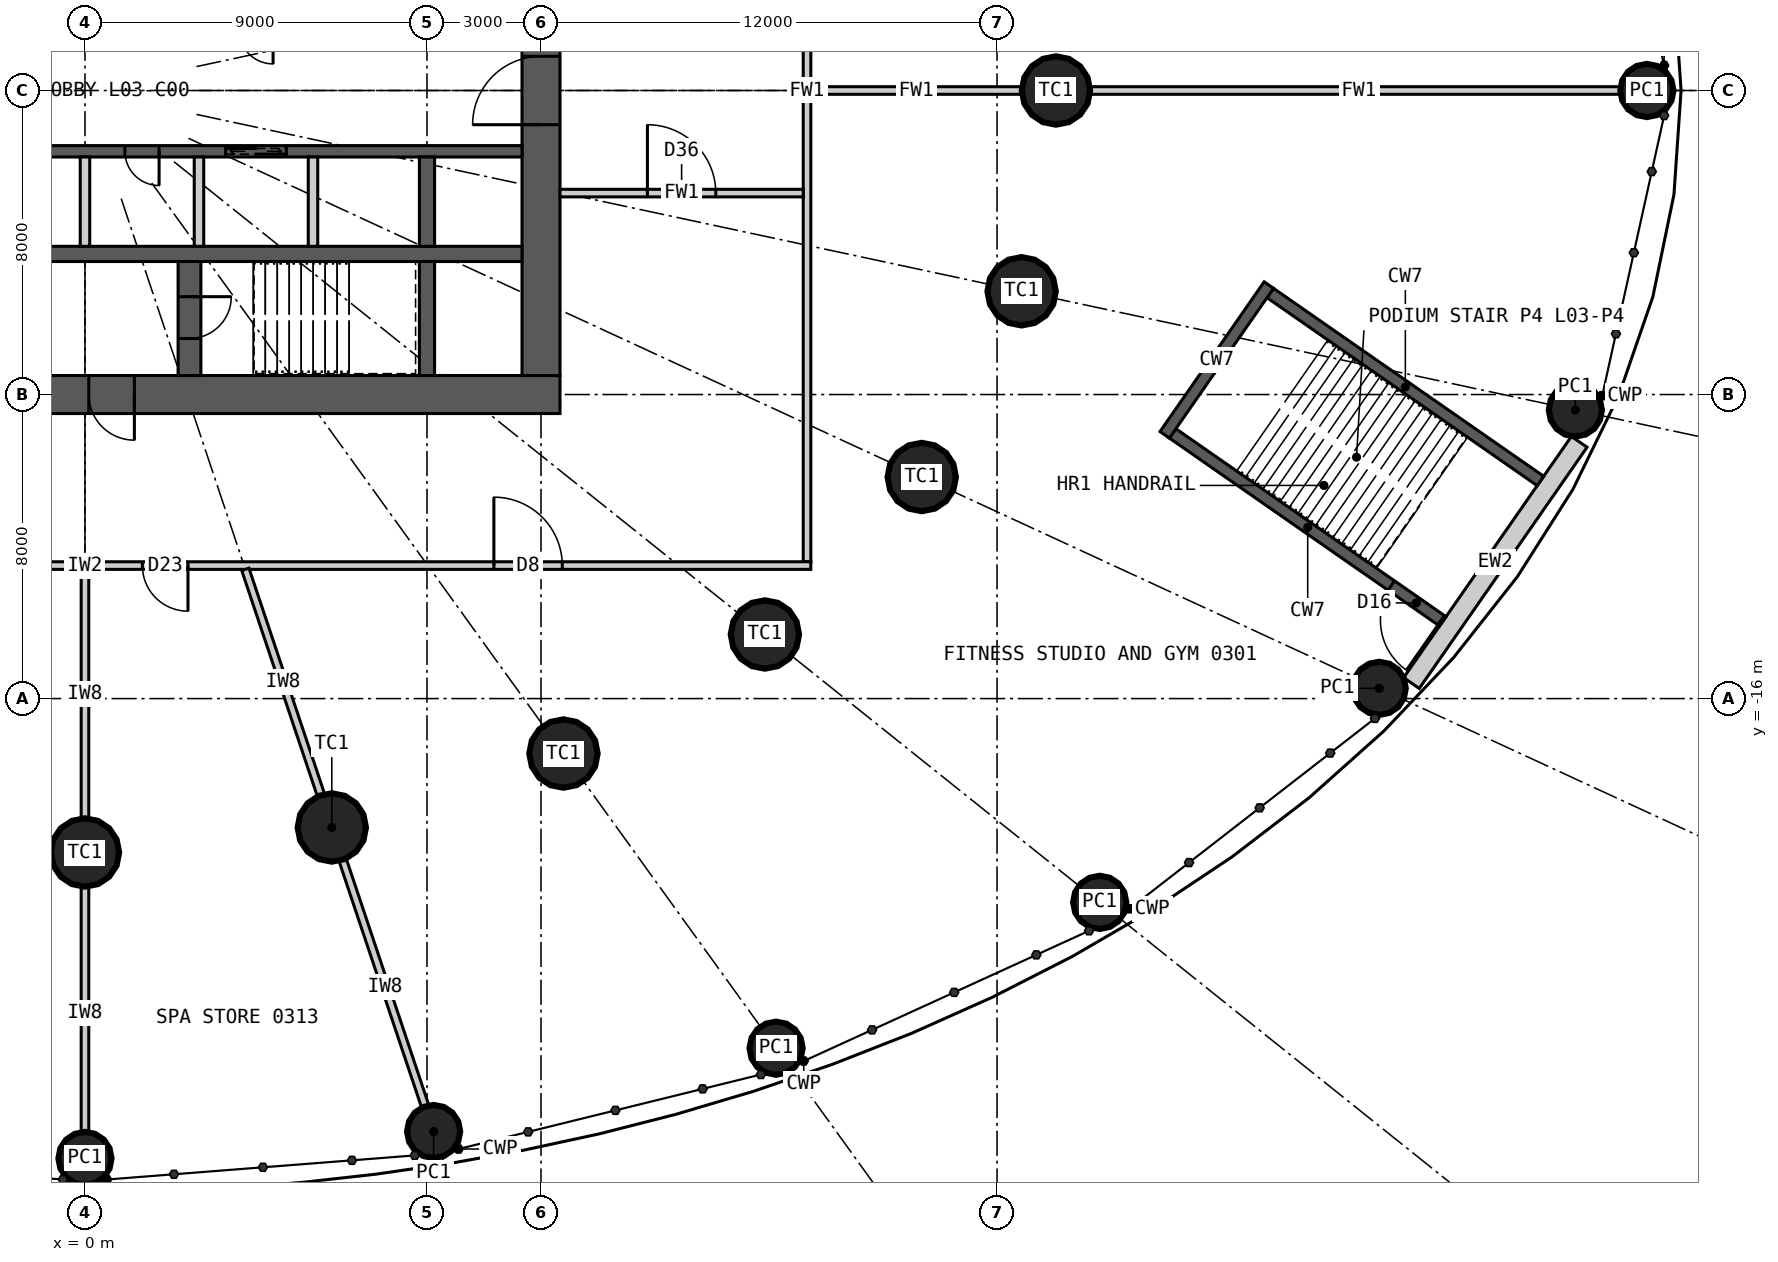
"""IFC4 building model, lengths in metres.
Left out: names, types, materials, properties, quantities, classifications, styles, units other than length and angle.
Written with IfcOpenShell. Run it as: python <this file> out.ifc"""

import sys

from ifc_helpers import new_model, si_unit, direction, frame, frame_2d, origin, origin_2d, place, context, subcontext, project, spatial, rectangle, circle, extrude, element, fill, save


model = new_model("IFC4")
c1 = context("Model", 3, precision=1e-05, world=origin(), true_north=direction((0.0, 1.0)))
c2 = subcontext(c1, "Body", "Model", "MODEL_VIEW")
j1 = project(units=[si_unit("LENGTHUNIT", "METRE"), si_unit("PLANEANGLEUNIT", "RADIAN")], contexts=[c1])
p1 = place(None, origin())
s1 = spatial("IfcSite", under=j1, at=p1, CompositionType="ELEMENT")
p2 = place(p1, origin())
s2 = spatial("IfcBuilding", under=s1, at=p2, CompositionType="ELEMENT")
p3 = place(p2, frame((0.0, 0.0, 19.2)))
s3 = spatial("IfcBuildingStorey", under=s2, at=p3, CompositionType="ELEMENT", Elevation=19.2)
for number, where, z_axis, x_axis in (
    (1, (25.55, 0.0, 0.0), (0.0, 0.0, 1.0), (1.0, 0.0, 0.0)),
    (2, (0.0, -20.05, 0.0), (0.0, 0.0, 1.0), (1.0, 0.0, 0.0)),
    (3, (6.495, -19.391, 0.0), (0.0, 0.0, 1.0), (1.0, 0.0, 0.0)),
    (4, (12.591, -17.447, 0.0), (0.0, 0.0, 1.0), (1.0, 0.0, 0.0)),
    (5, (17.892, -14.313, 0.0), (0.0, 0.0, 1.0), (1.0, 0.0, 0.0)),
    (6, (22.019, -10.17, 0.0), (0.0, 0.0, 1.0), (1.0, 0.0, 0.0)),
    (7, (24.647, -5.283, 0.0), (0.0, 0.0, 1.0), (1.0, 0.0, 0.0)),
):
    element("IfcColumn", number, at=place(p3, frame(where, z_axis=z_axis, x_axis=x_axis)), inside=s3, PredefinedType="COLUMN", context=c2, shape_type="SweptSolid", body=[
        extrude(circle(Radius=0.9, at=origin_2d()), origin(), (0.0, 0.0, 1.0), 5.4),
    ])
for number, where, z_axis, x_axis in (
    (8, (41.1, 0.0, 0.0), (0.0, 0.0, 1.0), (1.0, 0.0, 0.0)),
    (9, (0.0, -28.1, 0.0), (0.0, 0.0, 1.0), (1.0, 0.0, 0.0)),
    (10, (9.174, -27.391, 0.0), (0.0, 0.0, 1.0), (1.0, 0.0, 0.0)),
    (11, (18.186, -25.199, 0.0), (0.0, 0.0, 1.0), (1.0, 0.0, 0.0)),
    (12, (26.702, -21.362, 0.0), (0.0, 0.0, 1.0), (1.0, 0.0, 0.0)),
    (13, (34.057, -15.73, 0.0), (0.0, 0.0, 1.0), (1.0, 0.0, 0.0)),
    (14, (39.218, -8.407, 0.0), (0.0, 0.0, 1.0), (1.0, 0.0, 0.0)),
):
    element("IfcColumn", number, at=place(p3, frame(where, z_axis=z_axis, x_axis=x_axis)), inside=s3, PredefinedType="COLUMN", context=c2, shape_type="SweptSolid", body=[
        extrude(circle(Radius=0.7, at=origin_2d()), origin(), (0.0, 0.0, 1.0), 5.4),
    ])
p4 = place(p3, frame((12.5, -8.0, 0.0), z_axis=(0.0, 0.0, 1.0), x_axis=(-1.0, 0.0, 0.0)))
e15 = element("IfcWall", 15, at=p4, inside=s3, PredefinedType="SHEAR", context=c2, shape_type="SweptSolid", body=[
    extrude(rectangle(XDim=25.0, YDim=1.0, at=frame_2d((12.5, 0.0))), origin(), (0.0, 0.0, 1.0), 5.4),
])
p5 = place(p4, frame((11.2, 0.0, 0.0)))
e16 = element("IfcOpeningElement", 16, at=p5, cuts=e15, PredefinedType="OPENING", context=c2, shape_type="SweptSolid", body=[
    extrude(rectangle(XDim=1.2, YDim=2.2, at=frame_2d((0.6, 1.1))), frame((0.0, 0.51, 0.0), z_axis=(0.0, -1.0, 0.0), x_axis=(1.0, 0.0, 0.0)), (0.0, 0.0, 1.0), 1.02),
])
p6 = place(p4, frame((18.8, 0.0, 0.0)))
e17 = element("IfcOpeningElement", 17, at=p6, cuts=e15, PredefinedType="OPENING", context=c2, shape_type="SweptSolid", body=[
    extrude(rectangle(XDim=0.9, YDim=2.2, at=frame_2d((0.45, 1.1))), frame((0.0, 0.51, 0.0), z_axis=(0.0, -1.0, 0.0), x_axis=(1.0, 0.0, 0.0)), (0.0, 0.0, 1.0), 1.02),
])
p7 = place(p3, frame((12.0, -7.5, 0.0), z_axis=(0.0, 0.0, 1.0), x_axis=(0.0, 1.0, 0.0)))
e18 = element("IfcWall", 18, at=p7, inside=s3, PredefinedType="SHEAR", context=c2, shape_type="SweptSolid", body=[
    extrude(rectangle(XDim=15.0, YDim=1.0, at=frame_2d((7.5, 0.0))), origin(), (0.0, 0.0, 1.0), 5.4),
])
p8 = place(p7, frame((6.6, 0.0, 0.0)))
e19 = element("IfcOpeningElement", 19, at=p8, cuts=e18, PredefinedType="OPENING", context=c2, shape_type="SweptSolid", body=[
    extrude(rectangle(XDim=1.8, YDim=2.2, at=frame_2d((0.9, 1.1))), frame((0.0, 0.51, 0.0), z_axis=(0.0, -1.0, 0.0), x_axis=(1.0, 0.0, 0.0)), (0.0, 0.0, 1.0), 1.02),
])
p9 = place(p3, frame((-11.5, -4.3, 0.0), z_axis=(0.0, 0.0, 1.0), x_axis=(1.0, 0.0, 0.0)))
e20 = element("IfcWall", 20, at=p9, inside=s3, PredefinedType="SHEAR", context=c2, shape_type="SweptSolid", body=[
    extrude(rectangle(XDim=23.0, YDim=0.4, at=frame_2d((11.5, 0.0))), origin(), (0.0, 0.0, 1.0), 5.4),
])
p10 = place(p3, frame((-11.5, -1.6, 0.0), z_axis=(0.0, 0.0, 1.0), x_axis=(1.0, 0.0, 0.0)))
e21 = element("IfcWall", 21, at=p10, inside=s3, PredefinedType="SHEAR", context=c2, shape_type="SweptSolid", body=[
    extrude(rectangle(XDim=23.0, YDim=0.3, at=frame_2d((11.5, 0.0))), origin(), (0.0, 0.0, 1.0), 5.4),
])
p11 = place(p10, frame((15.2, 0.0, 0.0)))
e22 = element("IfcOpeningElement", 22, at=p11, cuts=e21, PredefinedType="OPENING", context=c2, shape_type="SweptSolid", body=[
    extrude(rectangle(XDim=1.6, YDim=2.4, at=frame_2d((0.8, 1.2))), frame((0.0, 0.16, 0.0), z_axis=(0.0, -1.0, 0.0), x_axis=(1.0, 0.0, 0.0)), (0.0, 0.0, 1.0), 0.32),
])
p12 = place(p10, frame((8.05, 0.0, 0.0)))
e23 = element("IfcOpeningElement", 23, at=p12, cuts=e21, PredefinedType="OPENING", context=c2, shape_type="SweptSolid", body=[
    extrude(rectangle(XDim=0.9, YDim=2.2, at=frame_2d((0.45, 1.1))), frame((0.0, 0.16, 0.0), z_axis=(0.0, -1.0, 0.0), x_axis=(1.0, 0.0, 0.0)), (0.0, 0.0, 1.0), 0.32),
])
p13 = place(p10, frame((12.55, 0.0, 0.0)))
e24 = element("IfcOpeningElement", 24, at=p13, cuts=e21, PredefinedType="OPENING", context=c2, shape_type="SweptSolid", body=[
    extrude(rectangle(XDim=0.9, YDim=2.2, at=frame_2d((0.45, 1.1))), frame((0.0, 0.16, 0.0), z_axis=(0.0, -1.0, 0.0), x_axis=(1.0, 0.0, 0.0)), (0.0, 0.0, 1.0), 0.32),
])
p14 = place(p3, frame((9.0, -4.1, 0.0), z_axis=(0.0, 0.0, 1.0), x_axis=(0.0, 1.0, 0.0)))
e25 = element("IfcWall", 25, at=p14, inside=s3, PredefinedType="SHEAR", context=c2, shape_type="SweptSolid", body=[
    extrude(rectangle(XDim=2.35, YDim=0.4, at=frame_2d((1.175, 0.0))), origin(), (0.0, 0.0, 1.0), 5.4),
])
p15 = place(p3, frame((9.0, -7.5, 0.0), z_axis=(0.0, 0.0, 1.0), x_axis=(0.0, 1.0, 0.0)))
e26 = element("IfcWall", 26, at=p15, inside=s3, PredefinedType="SHEAR", context=c2, shape_type="SweptSolid", body=[
    extrude(rectangle(XDim=3.0, YDim=0.4, at=frame_2d((1.5, 0.0))), origin(), (0.0, 0.0, 1.0), 5.4),
])
p16 = place(p3, frame((2.75, -7.5, 0.0), z_axis=(0.0, 0.0, 1.0), x_axis=(0.0, 1.0, 0.0)))
e27 = element("IfcWall", 27, at=p16, inside=s3, PredefinedType="SHEAR", context=c2, shape_type="SweptSolid", body=[
    extrude(rectangle(XDim=3.0, YDim=0.6, at=frame_2d((1.5, 0.0))), origin(), (0.0, 0.0, 1.0), 5.4),
])
p17 = place(p16, frame((0.975, 0.0, 0.0)))
e28 = element("IfcOpeningElement", 28, at=p17, cuts=e27, PredefinedType="OPENING", context=c2, shape_type="SweptSolid", body=[
    extrude(rectangle(XDim=1.1, YDim=2.2, at=frame_2d((0.55, 1.1))), frame((0.0, 0.31, 0.0), z_axis=(0.0, -1.0, 0.0), x_axis=(1.0, 0.0, 0.0)), (0.0, 0.0, 1.0), 0.62),
])
for number, where, z_axis, x_axis in (
    (29, (0.0, -4.1, 0.0), (0.0, 0.0, 1.0), (0.0, 1.0, 0.0)),
    (30, (3.0, -4.1, 0.0), (0.0, 0.0, 1.0), (0.0, 1.0, 0.0)),
    (31, (6.0, -4.1, 0.0), (0.0, 0.0, 1.0), (0.0, 1.0, 0.0)),
):
    element("IfcWall", number, at=place(p3, frame(where, z_axis=z_axis, x_axis=x_axis)), inside=s3, PredefinedType="PARTITIONING", context=c2, shape_type="SweptSolid", body=[
        extrude(rectangle(XDim=2.35, YDim=0.25, at=frame_2d((1.175, 0.0))), origin(), (0.0, 0.0, 1.0), 5.4),
    ])
p18 = place(p3, frame((34.905, -15.592, 0.0), z_axis=(0.0, 0.0, 1.0), x_axis=(0.571029335057, 0.820929655028, 0.0)))
e32 = element("IfcWall", 32, at=p18, inside=s3, PredefinedType="SOLIDWALL", context=c2, shape_type="SweptSolid", body=[
    extrude(rectangle(XDim=7.733, YDim=0.5, at=frame_2d((3.866, 0.0))), origin(), (0.0, 0.0, 1.0), 5.15),
])
p19 = place(p3, frame((19.0, -12.4, 0.0), z_axis=(0.0, 0.0, 1.0), x_axis=(0.0, 1.0, 0.0)))
e33 = element("IfcWall", 33, at=p19, inside=s3, PredefinedType="PARTITIONING", context=c2, shape_type="SweptSolid", body=[
    extrude(rectangle(XDim=24.8, YDim=0.2, at=frame_2d((12.4, 0.0))), origin(), (0.0, 0.0, 1.0), 5.15),
])
p20 = place(p19, frame((17.8, 0.0, 0.0)))
e34 = element("IfcOpeningElement", 34, at=p20, cuts=e33, PredefinedType="OPENING", context=c2, shape_type="SweptSolid", body=[
    extrude(rectangle(XDim=1.8, YDim=2.4, at=frame_2d((0.9, 1.2))), frame((0.0, 0.11, 0.0), z_axis=(0.0, -1.0, 0.0), x_axis=(1.0, 0.0, 0.0)), (0.0, 0.0, 1.0), 0.22),
])
p21 = place(p3, frame((19.1, -12.5, 0.0), z_axis=(0.0, 0.0, 1.0), x_axis=(-1.0, 0.0, 0.0)))
e35 = element("IfcWall", 35, at=p21, inside=s3, PredefinedType="PARTITIONING", context=c2, shape_type="SweptSolid", body=[
    extrude(rectangle(XDim=38.2, YDim=0.2, at=frame_2d((19.1, 0.0))), origin(), (0.0, 0.0, 1.0), 5.15),
])
p22 = place(p21, frame((6.54, 0.0, 0.0)))
e36 = element("IfcOpeningElement", 36, at=p22, cuts=e35, PredefinedType="OPENING", context=c2, shape_type="SweptSolid", body=[
    extrude(rectangle(XDim=1.8, YDim=2.4, at=frame_2d((0.9, 1.2))), frame((0.0, 0.11, 0.0), z_axis=(0.0, -1.0, 0.0), x_axis=(1.0, 0.0, 0.0)), (0.0, 0.0, 1.0), 0.22),
])
p23 = place(p21, frame((27.52, 0.0, 0.0)))
e37 = element("IfcOpeningElement", 37, at=p23, cuts=e35, PredefinedType="OPENING", context=c2, shape_type="SweptSolid", body=[
    extrude(rectangle(XDim=1.0, YDim=2.2, at=frame_2d((0.5, 1.1))), frame((0.0, 0.11, 0.0), z_axis=(0.0, -1.0, 0.0), x_axis=(1.0, 0.0, 0.0)), (0.0, 0.0, 1.0), 0.22),
])
p24 = place(p21, frame((20.71, 0.0, 0.0)))
e38 = element("IfcOpeningElement", 38, at=p24, cuts=e35, PredefinedType="OPENING", context=c2, shape_type="SweptSolid", body=[
    extrude(rectangle(XDim=1.0, YDim=2.2, at=frame_2d((0.5, 1.1))), frame((0.0, 0.11, 0.0), z_axis=(0.0, -1.0, 0.0), x_axis=(1.0, 0.0, 0.0)), (0.0, 0.0, 1.0), 0.22),
])
p25 = place(p21, frame((16.39, 0.0, 0.0)))
e39 = element("IfcOpeningElement", 39, at=p25, cuts=e35, PredefinedType="OPENING", context=c2, shape_type="SweptSolid", body=[
    extrude(rectangle(XDim=1.2, YDim=2.2, at=frame_2d((0.6, 1.1))), frame((0.0, 0.11, 0.0), z_axis=(0.0, -1.0, 0.0), x_axis=(1.0, 0.0, 0.0)), (0.0, 0.0, 1.0), 0.22),
])
p26 = place(p21, frame((33.62, 0.0, 0.0)))
e40 = element("IfcOpeningElement", 40, at=p26, cuts=e35, PredefinedType="OPENING", context=c2, shape_type="SweptSolid", body=[
    extrude(rectangle(XDim=1.0, YDim=2.2, at=frame_2d((0.5, 1.1))), frame((0.0, 0.11, 0.0), z_axis=(0.0, -1.0, 0.0), x_axis=(1.0, 0.0, 0.0)), (0.0, 0.0, 1.0), 0.22),
])
p27 = place(p3, frame((19.1, 0.0, 0.0), z_axis=(0.0, 0.0, 1.0), x_axis=(1.0, 0.0, 0.0)))
e41 = element("IfcWall", 41, at=p27, inside=s3, PredefinedType="PARTITIONING", context=c2, shape_type="SweptSolid", body=[
    extrude(rectangle(XDim=5.55, YDim=0.2, at=frame_2d((2.775, 0.0))), origin(), (0.0, 0.0, 1.0), 4.25),
])
p28 = place(p3, frame((26.45, 0.0, 0.0), z_axis=(0.0, 0.0, 1.0), x_axis=(1.0, 0.0, 0.0)))
e42 = element("IfcWall", 42, at=p28, inside=s3, PredefinedType="PARTITIONING", context=c2, shape_type="SweptSolid", body=[
    extrude(rectangle(XDim=14.15, YDim=0.2, at=frame_2d((7.075, 0.0))), origin(), (0.0, 0.0, 1.0), 4.25),
])
p29 = place(p3, frame((0.0, -12.6, 0.0), z_axis=(0.0, 0.0, 1.0), x_axis=(0.0, -1.0, 0.0)))
e43 = element("IfcWall", 43, at=p29, inside=s3, PredefinedType="PARTITIONING", context=c2, shape_type="SweptSolid", body=[
    extrude(rectangle(XDim=6.55, YDim=0.2, at=frame_2d((3.275, 0.0))), origin(), (0.0, 0.0, 1.0), 4.3),
])
p30 = place(p3, frame((0.0, -20.95, 0.0), z_axis=(0.0, 0.0, 1.0), x_axis=(0.0, -1.0, 0.0)))
e44 = element("IfcWall", 44, at=p30, inside=s3, PredefinedType="PARTITIONING", context=c2, shape_type="SweptSolid", body=[
    extrude(rectangle(XDim=6.65, YDim=0.2, at=frame_2d((3.325, 0.0))), origin(), (0.0, 0.0, 1.0), 4.25),
])
p31 = place(p3, frame((4.22, -12.6, 0.0), z_axis=(0.0, 0.0, 1.0), x_axis=(0.317584173452, -0.9482300843, 0.0)))
e45 = element("IfcWall", 45, at=p31, inside=s3, PredefinedType="PARTITIONING", context=c2, shape_type="SweptSolid", body=[
    extrude(rectangle(XDim=6.262, YDim=0.2, at=frame_2d((3.131, 0.0))), origin(), (0.0, 0.0, 1.0), 4.3),
])
p32 = place(p3, frame((6.781, -20.245, 0.0), z_axis=(0.0, 0.0, 1.0), x_axis=(0.317580622989, -0.948231273425, 0.0)))
e46 = element("IfcWall", 46, at=p32, inside=s3, PredefinedType="PARTITIONING", context=c2, shape_type="SweptSolid", body=[
    extrude(rectangle(XDim=7.036, YDim=0.2, at=frame_2d((3.518, 0.0))), origin(), (0.0, 0.0, 1.0), 4.25),
])
p33 = place(p3, frame((35.729, -13.968, 0.0), z_axis=(0.0, 0.0, 1.0), x_axis=(-0.82092761123, 0.571032273274, 0.0)))
e47 = element("IfcWall", 47, at=p33, inside=s3, PredefinedType="SHEAR", context=c2, shape_type="SweptSolid", body=[
    extrude(rectangle(XDim=8.66, YDim=0.3, at=frame_2d((4.33, 0.0))), origin(), (0.0, 0.0, 1.0), 5.4),
])
p34 = place(p33, frame((0.05, 0.0, 0.0)))
e48 = element("IfcOpeningElement", 48, at=p34, cuts=e47, PredefinedType="OPENING", context=c2, shape_type="SweptSolid", body=[
    extrude(rectangle(XDim=1.6, YDim=2.1, at=frame_2d((0.8, 1.05))), frame((0.0, 0.16, 0.0), z_axis=(0.0, -1.0, 0.0), x_axis=(1.0, 0.0, 0.0)), (0.0, 0.0, 1.0), 0.32),
])
p35 = place(p3, frame((38.299, -10.274, 0.0), z_axis=(0.0, 0.0, 1.0), x_axis=(-0.820936803751, 0.571019057692, 0.0)))
e49 = element("IfcWall", 49, at=p35, inside=s3, PredefinedType="SHEAR", context=c2, shape_type="SweptSolid", body=[
    extrude(rectangle(XDim=8.66, YDim=0.3, at=frame_2d((4.33, 0.0))), origin(), (0.0, 0.0, 1.0), 5.4),
])
p36 = place(p3, frame((28.412, -9.06, 0.0), z_axis=(0.0, 0.0, 1.0), x_axis=(0.571036173178, 0.820924898467, 0.0)))
e50 = element("IfcWall", 50, at=p36, inside=s3, PredefinedType="SHEAR", context=c2, shape_type="SweptSolid", body=[
    extrude(rectangle(XDim=4.8, YDim=0.3, at=frame_2d((2.4, 0.0))), origin(), (0.0, 0.0, 1.0), 5.4),
])
p37 = place(p3, frame((18.9, -2.7, 0.0), z_axis=(0.0, 0.0, 1.0), x_axis=(-1.0, 0.0, 0.0)))
e51 = element("IfcWall", 51, at=p37, inside=s3, PredefinedType="PARTITIONING", context=c2, shape_type="SweptSolid", body=[
    extrude(rectangle(XDim=6.4, YDim=0.2, at=frame_2d((3.2, 0.0))), origin(), (0.0, 0.0, 1.0), 5.15),
])
p38 = place(p37, frame((2.3, 0.0, 0.0)))
e52 = element("IfcOpeningElement", 52, at=p38, cuts=e51, PredefinedType="OPENING", context=c2, shape_type="SweptSolid", body=[
    extrude(rectangle(XDim=1.8, YDim=2.4, at=frame_2d((0.9, 1.2))), frame((0.0, 0.11, 0.0), z_axis=(0.0, -1.0, 0.0), x_axis=(1.0, 0.0, 0.0)), (0.0, 0.0, 1.0), 0.22),
])
p39 = place(p34, origin())
e53 = element("IfcDoor", 53, at=p39, inside=s3, OperationType="SINGLE_SWING_LEFT", PredefinedType="DOOR", context=c2, shape_type="SweptSolid", body=[
    extrude(rectangle(XDim=1.6, YDim=2.1, at=frame_2d((0.8, 1.05))), frame((0.0, 0.025, 0.0), z_axis=(0.0, -1.0, 0.0), x_axis=(1.0, 0.0, 0.0)), (0.0, 0.0, 1.0), 0.05),
])
fill(e48, e53)
p40 = place(p22, origin())
e54 = element("IfcDoor", 54, at=p40, inside=s3, OperationType="DOUBLE_DOOR_DOUBLE_SWING", PredefinedType="DOOR", context=c2, shape_type="SweptSolid", body=[
    extrude(rectangle(XDim=1.8, YDim=2.4, at=frame_2d((0.9, 1.2))), frame((0.0, 0.025, 0.0), z_axis=(0.0, -1.0, 0.0), x_axis=(1.0, 0.0, 0.0)), (0.0, 0.0, 1.0), 0.05),
])
fill(e36, e54)
p41 = place(p25, origin())
e55 = element("IfcDoor", 55, at=p41, inside=s3, OperationType="SINGLE_SWING_LEFT", PredefinedType="DOOR", context=c2, shape_type="SweptSolid", body=[
    extrude(rectangle(XDim=1.2, YDim=2.2, at=frame_2d((0.6, 1.1))), frame((0.0, 0.025, 0.0), z_axis=(0.0, -1.0, 0.0), x_axis=(1.0, 0.0, 0.0)), (0.0, 0.0, 1.0), 0.05),
])
fill(e39, e55)
p42 = place(p38, origin())
e56 = element("IfcDoor", 56, at=p42, inside=s3, OperationType="DOUBLE_DOOR_DOUBLE_SWING", PredefinedType="DOOR", context=c2, shape_type="SweptSolid", body=[
    extrude(rectangle(XDim=1.8, YDim=2.4, at=frame_2d((0.9, 1.2))), frame((0.0, 0.025, 0.0), z_axis=(0.0, -1.0, 0.0), x_axis=(1.0, 0.0, 0.0)), (0.0, 0.0, 1.0), 0.05),
])
fill(e52, e56)
p43 = place(p5, origin())
e57 = element("IfcDoor", 57, at=p43, inside=s3, OperationType="SINGLE_SWING_LEFT", PredefinedType="DOOR", context=c2, shape_type="SweptSolid", body=[
    extrude(rectangle(XDim=1.2, YDim=2.2, at=frame_2d((0.6, 1.1))), frame((0.0, 0.025, 0.0), z_axis=(0.0, -1.0, 0.0), x_axis=(1.0, 0.0, 0.0)), (0.0, 0.0, 1.0), 0.05),
])
fill(e16, e57)
p44 = place(p17, origin())
e58 = element("IfcDoor", 58, at=p44, inside=s3, OperationType="SINGLE_SWING_RIGHT", PredefinedType="DOOR", context=c2, shape_type="SweptSolid", body=[
    extrude(rectangle(XDim=1.1, YDim=2.2, at=frame_2d((0.55, 1.1))), frame((0.0, 0.025, 0.0), z_axis=(0.0, -1.0, 0.0), x_axis=(1.0, 0.0, 0.0)), (0.0, 0.0, 1.0), 0.05),
])
fill(e28, e58)
p45 = place(p11, origin())
e59 = element("IfcDoor", 59, at=p45, inside=s3, OperationType="DOUBLE_DOOR_SLIDING", PredefinedType="DOOR", context=c2, shape_type="SweptSolid", body=[
    extrude(rectangle(XDim=1.6, YDim=2.4, at=frame_2d((0.8, 1.2))), frame((0.0, 0.025, 0.0), z_axis=(0.0, -1.0, 0.0), x_axis=(1.0, 0.0, 0.0)), (0.0, 0.0, 1.0), 0.05),
])
fill(e22, e59)
p46 = place(p13, origin())
e60 = element("IfcDoor", 60, at=p46, inside=s3, OperationType="SINGLE_SWING_RIGHT", PredefinedType="DOOR", context=c2, shape_type="SweptSolid", body=[
    extrude(rectangle(XDim=0.9, YDim=2.2, at=frame_2d((0.45, 1.1))), frame((0.0, 0.025, 0.0), z_axis=(0.0, -1.0, 0.0), x_axis=(1.0, 0.0, 0.0)), (0.0, 0.0, 1.0), 0.05),
])
fill(e24, e60)
p47 = place(p8, origin())
e61 = element("IfcDoor", 61, at=p47, inside=s3, OperationType="DOUBLE_DOOR_DOUBLE_SWING", PredefinedType="DOOR", context=c2, shape_type="SweptSolid", body=[
    extrude(rectangle(XDim=1.8, YDim=2.2, at=frame_2d((0.9, 1.1))), frame((0.0, 0.025, 0.0), z_axis=(0.0, -1.0, 0.0), x_axis=(1.0, 0.0, 0.0)), (0.0, 0.0, 1.0), 0.05),
])
fill(e19, e61)
save(model, sys.argv[1])
